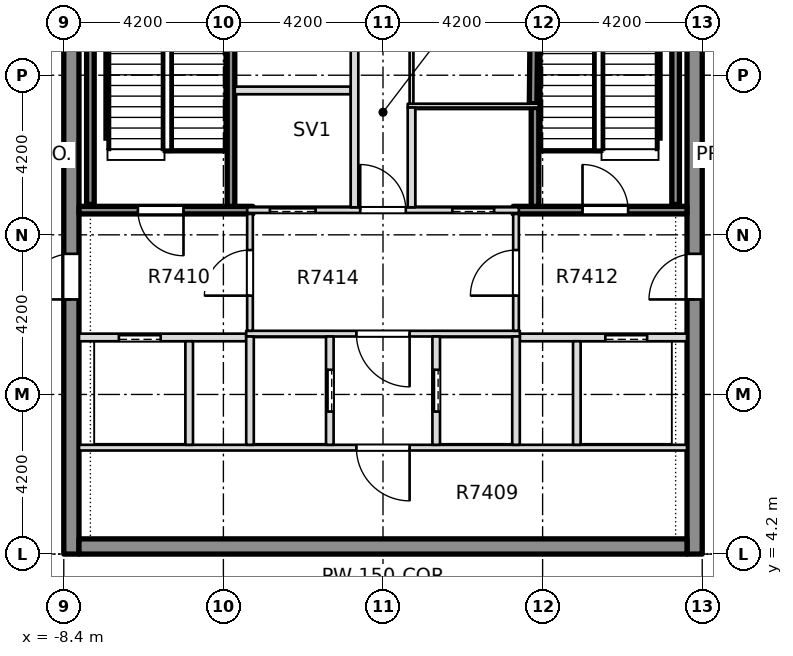
"""IFC4 building model, lengths in metres.
Left out: names, types, materials, properties, quantities, classifications, styles, units other than length and angle.
Written with IfcOpenShell. Run it as: python <this file> out.ifc"""

import sys

from ifc_helpers import new_model, si_unit, direction, frame, frame_2d, origin, place, context, subcontext, project, spatial, rectangle, extrude, element, fill, save


model = new_model("IFC4")
c1 = context("Model", 3, precision=1e-05, world=origin(), true_north=direction((0.0, 1.0)))
c2 = subcontext(c1, "Body", "Model", "MODEL_VIEW")
j1 = project(units=[si_unit("LENGTHUNIT", "METRE"), si_unit("PLANEANGLEUNIT", "RADIAN")], contexts=[c1])
p1 = place(None, origin())
s1 = spatial("IfcSite", under=j1, at=p1, CompositionType="ELEMENT")
p2 = place(p1, origin())
s2 = spatial("IfcBuilding", under=s1, at=p2, CompositionType="ELEMENT")
p3 = place(p2, frame((0.0, 0.0, 284.85)))
s3 = spatial("IfcBuildingStorey", under=s2, at=p3, CompositionType="ELEMENT", Elevation=284.85)
p4 = place(p3, frame((8.2, 4.2, -0.5), z_axis=(0.0, 0.0, 1.0), x_axis=(0.0, 1.0, 0.0)))
e1 = element("IfcWall", 1, at=p4, inside=s3, PredefinedType="SHEAR", context=c2, shape_type="SweptSolid", body=[
    extrude(rectangle(XDim=17.55, YDim=0.4, at=frame_2d((8.775, 0.0))), origin(), (0.0, 0.0, 1.0), 4.5),
])
p5 = place(p4, frame((6.7, 0.0, 0.5)))
e2 = element("IfcOpeningElement", 2, at=p5, cuts=e1, PredefinedType="OPENING", context=c2, shape_type="SweptSolid", body=[
    extrude(rectangle(XDim=1.2, YDim=2.1, at=frame_2d((0.6, 1.05))), frame((0.0, 0.21, 0.0), z_axis=(0.0, -1.0, 0.0), x_axis=(1.0, 0.0, 0.0)), (0.0, 0.0, 1.0), 0.42),
])
p6 = place(p3, frame((-8.2, 4.2, -0.5), z_axis=(0.0, 0.0, 1.0), x_axis=(0.0, 1.0, 0.0)))
e3 = element("IfcWall", 3, at=p6, inside=s3, PredefinedType="SHEAR", context=c2, shape_type="SweptSolid", body=[
    extrude(rectangle(XDim=17.55, YDim=0.4, at=frame_2d((8.775, 0.0))), origin(), (0.0, 0.0, 1.0), 4.5),
])
p7 = place(p6, frame((6.7, 0.0, 0.5)))
e4 = element("IfcOpeningElement", 4, at=p7, cuts=e3, PredefinedType="OPENING", context=c2, shape_type="SweptSolid", body=[
    extrude(rectangle(XDim=1.2, YDim=2.1, at=frame_2d((0.6, 1.05))), frame((0.0, 0.21, 0.0), z_axis=(0.0, -1.0, 0.0), x_axis=(1.0, 0.0, 0.0)), (0.0, 0.0, 1.0), 0.42),
])
p8 = place(p3, frame((-8.0, 4.4, -0.5), z_axis=(0.0, 0.0, 1.0), x_axis=(1.0, 0.0, 0.0)))
e5 = element("IfcWall", 5, at=p8, inside=s3, PredefinedType="SHEAR", context=c2, shape_type="SweptSolid", body=[
    extrude(rectangle(XDim=16.0, YDim=0.4, at=frame_2d((8.0, 0.0))), origin(), (0.0, 0.0, 1.0), 4.5),
])
p9 = place(p3, frame((-7.999, 7.0, 0.0), z_axis=(0.0, 0.0, 1.0), x_axis=(1.0, 0.0, 0.0)))
e6 = element("IfcWall", 6, at=p9, inside=s3, PredefinedType="PARTITIONING", context=c2, shape_type="SweptSolid", body=[
    extrude(rectangle(XDim=15.998, YDim=0.15, at=frame_2d((7.999, 0.0))), origin(), (0.0, 0.0, 1.0), 4.0),
])
p10 = place(p9, frame((7.299, 0.0, 0.0)))
e7 = element("IfcOpeningElement", 7, at=p10, cuts=e6, PredefinedType="OPENING", context=c2, shape_type="SweptSolid", body=[
    extrude(rectangle(XDim=1.4, YDim=2.1, at=frame_2d((0.7, 1.05))), frame((0.0, 0.085, 0.0), z_axis=(0.0, -1.0, 0.0), x_axis=(1.0, 0.0, 0.0)), (0.0, 0.0, 1.0), 0.17),
])
p11 = place(p3, frame((-7.999, 9.9, 0.0), z_axis=(0.0, 0.0, 1.0), x_axis=(1.0, 0.0, 0.0)))
e8 = element("IfcWall", 8, at=p11, inside=s3, PredefinedType="PARTITIONING", context=c2, shape_type="SweptSolid", body=[
    extrude(rectangle(XDim=4.399, YDim=0.2, at=frame_2d((2.199, 0.0))), origin(), (0.0, 0.0, 1.0), 4.0),
])
p12 = place(p11, frame((1.049, 0.0, 0.0)))
e9 = element("IfcOpeningElement", 9, at=p12, cuts=e8, PredefinedType="OPENING", context=c2, shape_type="SweptSolid", body=[
    extrude(rectangle(XDim=1.1, YDim=2.1, at=frame_2d((0.55, 1.05))), frame((0.0, 0.11, 0.0), z_axis=(0.0, -1.0, 0.0), x_axis=(1.0, 0.0, 0.0)), (0.0, 0.0, 1.0), 0.22),
])
p13 = place(p3, frame((3.6, 9.9, 0.0), z_axis=(0.0, 0.0, 1.0), x_axis=(1.0, 0.0, 0.0)))
e10 = element("IfcWall", 10, at=p13, inside=s3, PredefinedType="PARTITIONING", context=c2, shape_type="SweptSolid", body=[
    extrude(rectangle(XDim=4.399, YDim=0.2, at=frame_2d((2.199, 0.0))), origin(), (0.0, 0.0, 1.0), 4.0),
])
p14 = place(p13, frame((2.25, 0.0, 0.0)))
e11 = element("IfcOpeningElement", 11, at=p14, cuts=e10, PredefinedType="OPENING", context=c2, shape_type="SweptSolid", body=[
    extrude(rectangle(XDim=1.1, YDim=2.1, at=frame_2d((0.55, 1.05))), frame((0.0, 0.11, 0.0), z_axis=(0.0, -1.0, 0.0), x_axis=(1.0, 0.0, 0.0)), (0.0, 0.0, 1.0), 0.22),
])
p15 = place(p3, frame((-3.6, 10.0, 0.0), z_axis=(0.0, 0.0, 1.0), x_axis=(1.0, 0.0, 0.0)))
e12 = element("IfcWall", 12, at=p15, inside=s3, PredefinedType="PARTITIONING", context=c2, shape_type="SweptSolid", body=[
    extrude(rectangle(XDim=7.2, YDim=0.15, at=frame_2d((3.6, 0.0))), origin(), (0.0, 0.0, 1.0), 4.0),
])
p16 = place(p15, frame((2.9, 0.0, 0.0)))
e13 = element("IfcOpeningElement", 13, at=p16, cuts=e12, PredefinedType="OPENING", context=c2, shape_type="SweptSolid", body=[
    extrude(rectangle(XDim=1.4, YDim=2.1, at=frame_2d((0.7, 1.05))), frame((0.0, 0.085, 0.0), z_axis=(0.0, -1.0, 0.0), x_axis=(1.0, 0.0, 0.0)), (0.0, 0.0, 1.0), 0.17),
])
p17 = place(p3, frame((-7.999, 13.25, 0.0), z_axis=(0.0, 0.0, 1.0), x_axis=(1.0, 0.0, 0.0)))
e14 = element("IfcWall", 14, at=p17, inside=s3, PredefinedType="SOLIDWALL", context=c2, shape_type="SweptSolid", body=[
    extrude(rectangle(XDim=4.574, YDim=0.2, at=frame_2d((2.287, 0.0))), origin(), (0.0, 0.0, 1.0), 4.0),
])
p18 = place(p17, frame((1.549, 0.0, 0.0)))
e15 = element("IfcOpeningElement", 15, at=p18, cuts=e14, PredefinedType="OPENING", context=c2, shape_type="SweptSolid", body=[
    extrude(rectangle(XDim=1.2, YDim=2.1, at=frame_2d((0.6, 1.05))), frame((0.0, 0.11, 0.0), z_axis=(0.0, -1.0, 0.0), x_axis=(1.0, 0.0, 0.0)), (0.0, 0.0, 1.0), 0.22),
])
p19 = place(p3, frame((-3.575, 13.25, 0.0), z_axis=(0.0, 0.0, 1.0), x_axis=(1.0, 0.0, 0.0)))
e16 = element("IfcWall", 16, at=p19, inside=s3, PredefinedType="PARTITIONING", context=c2, shape_type="SweptSolid", body=[
    extrude(rectangle(XDim=7.15, YDim=0.15, at=frame_2d((3.575, 0.0))), origin(), (0.0, 0.0, 1.0), 4.0),
])
p20 = place(p19, frame((0.6, 0.0, 0.0)))
e17 = element("IfcOpeningElement", 17, at=p20, cuts=e16, PredefinedType="OPENING", context=c2, shape_type="SweptSolid", body=[
    extrude(rectangle(XDim=1.2, YDim=2.1, at=frame_2d((0.6, 1.05))), frame((0.0, 0.085, 0.0), z_axis=(0.0, -1.0, 0.0), x_axis=(1.0, 0.0, 0.0)), (0.0, 0.0, 1.0), 0.17),
])
p21 = place(p19, frame((5.4, 0.0, 0.0)))
e18 = element("IfcOpeningElement", 18, at=p21, cuts=e16, PredefinedType="OPENING", context=c2, shape_type="SweptSolid", body=[
    extrude(rectangle(XDim=1.1, YDim=2.1, at=frame_2d((0.55, 1.05))), frame((0.0, 0.085, 0.0), z_axis=(0.0, -1.0, 0.0), x_axis=(1.0, 0.0, 0.0)), (0.0, 0.0, 1.0), 0.17),
])
p22 = place(p19, frame((2.975, 0.0, 0.0)))
e19 = element("IfcOpeningElement", 19, at=p22, cuts=e16, PredefinedType="OPENING", context=c2, shape_type="SweptSolid", body=[
    extrude(rectangle(XDim=1.2, YDim=2.1, at=frame_2d((0.6, 1.05))), frame((0.0, 0.085, 0.0), z_axis=(0.0, -1.0, 0.0), x_axis=(1.0, 0.0, 0.0)), (0.0, 0.0, 1.0), 0.17),
])
p23 = place(p3, frame((3.425, 13.25, 0.0), z_axis=(0.0, 0.0, 1.0), x_axis=(1.0, 0.0, 0.0)))
e20 = element("IfcWall", 20, at=p23, inside=s3, PredefinedType="SOLIDWALL", context=c2, shape_type="SweptSolid", body=[
    extrude(rectangle(XDim=4.574, YDim=0.2, at=frame_2d((2.287, 0.0))), origin(), (0.0, 0.0, 1.0), 4.0),
])
p24 = place(p23, frame((1.825, 0.0, 0.0)))
e21 = element("IfcOpeningElement", 21, at=p24, cuts=e20, PredefinedType="OPENING", context=c2, shape_type="SweptSolid", body=[
    extrude(rectangle(XDim=1.2, YDim=2.1, at=frame_2d((0.6, 1.05))), frame((0.0, 0.11, 0.0), z_axis=(0.0, -1.0, 0.0), x_axis=(1.0, 0.0, 0.0)), (0.0, 0.0, 1.0), 0.22),
])
p25 = place(p3, frame((0.65, 16.0, 0.0), z_axis=(0.0, 0.0, 1.0), x_axis=(1.0, 0.0, 0.0)))
e22 = element("IfcWall", 22, at=p25, inside=s3, PredefinedType="PARTITIONING", context=c2, shape_type="SweptSolid", body=[
    extrude(rectangle(XDim=3.45, YDim=0.1, at=frame_2d((1.725, 0.0))), origin(), (0.0, 0.0, 1.0), 4.0),
])
p26 = place(p3, frame((-3.9, 16.4, 0.0), z_axis=(0.0, 0.0, 1.0), x_axis=(1.0, 0.0, 0.0)))
e23 = element("IfcWall", 23, at=p26, inside=s3, PredefinedType="PARTITIONING", context=c2, shape_type="SweptSolid", body=[
    extrude(rectangle(XDim=3.05, YDim=0.2, at=frame_2d((1.525, 0.0))), origin(), (0.0, 0.0, 1.0), 4.0),
])
p27 = place(p3, frame((-5.1, 7.075, 0.0), z_axis=(0.0, 0.0, 1.0), x_axis=(0.0, 1.0, 0.0)))
e24 = element("IfcWall", 24, at=p27, inside=s3, PredefinedType="PARTITIONING", context=c2, shape_type="SweptSolid", body=[
    extrude(rectangle(XDim=2.725, YDim=0.2, at=frame_2d((1.363, 0.0))), origin(), (0.0, 0.0, 1.0), 4.0),
])
p28 = place(p3, frame((-4.0, 13.35, 0.0), z_axis=(0.0, 0.0, 1.0), x_axis=(0.0, 1.0, 0.0)))
e25 = element("IfcWall", 25, at=p28, inside=s3, PredefinedType="SOLIDWALL", context=c2, shape_type="SweptSolid", body=[
    extrude(rectangle(XDim=7.999, YDim=0.2, at=frame_2d((4.0, 0.0))), origin(), (0.0, 0.0, 1.0), 4.0),
])
p29 = place(p3, frame((-3.5, 7.075, 0.0), z_axis=(0.0, 0.0, 1.0), x_axis=(0.0, 1.0, 0.0)))
e26 = element("IfcWall", 26, at=p29, inside=s3, PredefinedType="PARTITIONING", context=c2, shape_type="SweptSolid", body=[
    extrude(rectangle(XDim=2.85, YDim=0.2, at=frame_2d((1.425, 0.0))), origin(), (0.0, 0.0, 1.0), 4.0),
])
p30 = place(p3, frame((-3.5, 10.075, 0.0), z_axis=(0.0, 0.0, 1.0), x_axis=(0.0, 1.0, 0.0)))
e27 = element("IfcWall", 27, at=p30, inside=s3, PredefinedType="PARTITIONING", context=c2, shape_type="SweptSolid", body=[
    extrude(rectangle(XDim=3.075, YDim=0.15, at=frame_2d((1.538, 0.0))), origin(), (0.0, 0.0, 1.0), 4.0),
])
p31 = place(p30, frame((0.925, 0.0, 0.0)))
e28 = element("IfcOpeningElement", 28, at=p31, cuts=e27, PredefinedType="OPENING", context=c2, shape_type="SweptSolid", body=[
    extrude(rectangle(XDim=1.2, YDim=2.1, at=frame_2d((0.6, 1.05))), frame((0.0, 0.085, 0.0), z_axis=(0.0, -1.0, 0.0), x_axis=(1.0, 0.0, 0.0)), (0.0, 0.0, 1.0), 0.17),
])
p32 = place(p3, frame((-1.4, 7.075, 0.0), z_axis=(0.0, 0.0, 1.0), x_axis=(0.0, 1.0, 0.0)))
e29 = element("IfcWall", 29, at=p32, inside=s3, PredefinedType="PARTITIONING", context=c2, shape_type="SweptSolid", body=[
    extrude(rectangle(XDim=2.85, YDim=0.2, at=frame_2d((1.425, 0.0))), origin(), (0.0, 0.0, 1.0), 4.0),
])
p33 = place(p32, frame((0.875, 0.0, 0.0)))
e30 = element("IfcOpeningElement", 30, at=p33, cuts=e29, PredefinedType="OPENING", context=c2, shape_type="SweptSolid", body=[
    extrude(rectangle(XDim=1.1, YDim=2.1, at=frame_2d((0.55, 1.05))), frame((0.0, 0.11, 0.0), z_axis=(0.0, -1.0, 0.0), x_axis=(1.0, 0.0, 0.0)), (0.0, 0.0, 1.0), 0.22),
])
p34 = place(p3, frame((-0.75, 13.325, 0.0), z_axis=(0.0, 0.0, 1.0), x_axis=(0.0, 1.0, 0.0)))
e31 = element("IfcWall", 31, at=p34, inside=s3, PredefinedType="PARTITIONING", context=c2, shape_type="SweptSolid", body=[
    extrude(rectangle(XDim=8.024, YDim=0.2, at=frame_2d((4.012, 0.0))), origin(), (0.0, 0.0, 1.0), 4.0),
])
p35 = place(p34, frame((4.8, 0.0, 0.0)))
e32 = element("IfcOpeningElement", 32, at=p35, cuts=e31, PredefinedType="OPENING", context=c2, shape_type="SweptSolid", body=[
    extrude(rectangle(XDim=0.95, YDim=2.1, at=frame_2d((0.475, 1.05))), frame((0.0, 0.11, 0.0), z_axis=(0.0, -1.0, 0.0), x_axis=(1.0, 0.0, 0.0)), (0.0, 0.0, 1.0), 0.22),
])
p36 = place(p3, frame((0.75, 13.325, 0.0), z_axis=(0.0, 0.0, 1.0), x_axis=(0.0, 1.0, 0.0)))
e33 = element("IfcWall", 33, at=p36, inside=s3, PredefinedType="PARTITIONING", context=c2, shape_type="SweptSolid", body=[
    extrude(rectangle(XDim=2.625, YDim=0.2, at=frame_2d((1.312, 0.0))), origin(), (0.0, 0.0, 1.0), 4.0),
])
p37 = place(p3, frame((0.75, 16.05, 0.0), z_axis=(0.0, 0.0, 1.0), x_axis=(0.0, 1.0, 0.0)))
e34 = element("IfcWall", 34, at=p37, inside=s3, PredefinedType="PARTITIONING", context=c2, shape_type="SweptSolid", body=[
    extrude(rectangle(XDim=5.299, YDim=0.1, at=frame_2d((2.649, 0.0))), origin(), (0.0, 0.0, 1.0), 4.0),
])
p38 = place(p37, frame((1.875, 0.0, 0.0)))
e35 = element("IfcOpeningElement", 35, at=p38, cuts=e34, PredefinedType="OPENING", context=c2, shape_type="SweptSolid", body=[
    extrude(rectangle(XDim=0.95, YDim=2.1, at=frame_2d((0.475, 1.05))), frame((0.0, 0.06, 0.0), z_axis=(0.0, -1.0, 0.0), x_axis=(1.0, 0.0, 0.0)), (0.0, 0.0, 1.0), 0.12),
])
p39 = place(p3, frame((1.4, 7.075, 0.0), z_axis=(0.0, 0.0, 1.0), x_axis=(0.0, 1.0, 0.0)))
e36 = element("IfcWall", 36, at=p39, inside=s3, PredefinedType="PARTITIONING", context=c2, shape_type="SweptSolid", body=[
    extrude(rectangle(XDim=2.85, YDim=0.2, at=frame_2d((1.425, 0.0))), origin(), (0.0, 0.0, 1.0), 4.0),
])
p40 = place(p39, frame((0.875, 0.0, 0.0)))
e37 = element("IfcOpeningElement", 37, at=p40, cuts=e36, PredefinedType="OPENING", context=c2, shape_type="SweptSolid", body=[
    extrude(rectangle(XDim=1.1, YDim=2.1, at=frame_2d((0.55, 1.05))), frame((0.0, 0.11, 0.0), z_axis=(0.0, -1.0, 0.0), x_axis=(1.0, 0.0, 0.0)), (0.0, 0.0, 1.0), 0.22),
])
p41 = place(p3, frame((3.5, 7.075, 0.0), z_axis=(0.0, 0.0, 1.0), x_axis=(0.0, 1.0, 0.0)))
e38 = element("IfcWall", 38, at=p41, inside=s3, PredefinedType="PARTITIONING", context=c2, shape_type="SweptSolid", body=[
    extrude(rectangle(XDim=2.85, YDim=0.2, at=frame_2d((1.425, 0.0))), origin(), (0.0, 0.0, 1.0), 4.0),
])
p42 = place(p3, frame((3.5, 10.075, 0.0), z_axis=(0.0, 0.0, 1.0), x_axis=(0.0, 1.0, 0.0)))
e39 = element("IfcWall", 39, at=p42, inside=s3, PredefinedType="PARTITIONING", context=c2, shape_type="SweptSolid", body=[
    extrude(rectangle(XDim=3.075, YDim=0.15, at=frame_2d((1.538, 0.0))), origin(), (0.0, 0.0, 1.0), 4.0),
])
p43 = place(p42, frame((0.925, 0.0, 0.0)))
e40 = element("IfcOpeningElement", 40, at=p43, cuts=e39, PredefinedType="OPENING", context=c2, shape_type="SweptSolid", body=[
    extrude(rectangle(XDim=1.2, YDim=2.1, at=frame_2d((0.6, 1.05))), frame((0.0, 0.085, 0.0), z_axis=(0.0, -1.0, 0.0), x_axis=(1.0, 0.0, 0.0)), (0.0, 0.0, 1.0), 0.17),
])
p44 = place(p3, frame((4.0, 13.35, 0.0), z_axis=(0.0, 0.0, 1.0), x_axis=(0.0, 1.0, 0.0)))
e41 = element("IfcWall", 41, at=p44, inside=s3, PredefinedType="SOLIDWALL", context=c2, shape_type="SweptSolid", body=[
    extrude(rectangle(XDim=2.6, YDim=0.2, at=frame_2d((1.3, 0.0))), origin(), (0.0, 0.0, 1.0), 4.0),
])
p45 = place(p3, frame((3.95, 16.05, 0.0), z_axis=(0.0, 0.0, 1.0), x_axis=(0.009534450323, 0.999954546095, 0.0)))
e42 = element("IfcWall", 42, at=p45, inside=s3, PredefinedType="SOLIDWALL", context=c2, shape_type="SweptSolid", body=[
    extrude(rectangle(XDim=5.249, YDim=0.2, at=frame_2d((2.625, 0.0))), origin(), (0.0, 0.0, 1.0), 4.0),
])
p46 = place(p3, frame((5.1, 7.075, 0.0), z_axis=(0.0, 0.0, 1.0), x_axis=(0.0, 1.0, 0.0)))
e43 = element("IfcWall", 43, at=p46, inside=s3, PredefinedType="PARTITIONING", context=c2, shape_type="SweptSolid", body=[
    extrude(rectangle(XDim=2.725, YDim=0.2, at=frame_2d((1.363, 0.0))), origin(), (0.0, 0.0, 1.0), 4.0),
])
for number, where, z_axis, x_axis in (
    (44, (-7.7, 13.4, 0.0), (0.0, 0.0, 1.0), (0.0, 1.0, 0.0)),
    (45, (7.7, 13.4, 0.0), (0.0, 0.0, 1.0), (0.0, 1.0, 0.0)),
):
    element("IfcWall", number, at=place(p3, frame(where, z_axis=z_axis, x_axis=x_axis)), inside=s3, PredefinedType="SOLIDWALL", context=c2, shape_type="SweptSolid", body=[
        extrude(rectangle(XDim=7.45, YDim=0.2, at=frame_2d((3.725, 0.0))), origin(), (0.0, 0.0, 1.0), 4.0),
    ])
p47 = place(p18, origin())
e46 = element("IfcDoor", 46, at=p47, inside=s3, OperationType="SINGLE_SWING_LEFT", PredefinedType="DOOR", context=c2, shape_type="SweptSolid", body=[
    extrude(rectangle(XDim=1.2, YDim=2.1, at=frame_2d((0.6, 1.05))), frame((0.0, 0.025, 0.0), z_axis=(0.0, -1.0, 0.0), x_axis=(1.0, 0.0, 0.0)), (0.0, 0.0, 1.0), 0.05),
])
fill(e15, e46)
p48 = place(p12, origin())
e47 = element("IfcDoor", 47, at=p48, inside=s3, OperationType="SLIDING_TO_LEFT", PredefinedType="DOOR", context=c2, shape_type="SweptSolid", body=[
    extrude(rectangle(XDim=1.1, YDim=2.1, at=frame_2d((0.55, 1.05))), frame((0.0, 0.025, 0.0), z_axis=(0.0, -1.0, 0.0), x_axis=(1.0, 0.0, 0.0)), (0.0, 0.0, 1.0), 0.05),
])
fill(e9, e47)
p49 = place(p24, origin())
e48 = element("IfcDoor", 48, at=p49, inside=s3, OperationType="SINGLE_SWING_RIGHT", PredefinedType="DOOR", context=c2, shape_type="SweptSolid", body=[
    extrude(rectangle(XDim=1.2, YDim=2.1, at=frame_2d((0.6, 1.05))), frame((0.0, 0.025, 0.0), z_axis=(0.0, -1.0, 0.0), x_axis=(1.0, 0.0, 0.0)), (0.0, 0.0, 1.0), 0.05),
])
fill(e21, e48)
p50 = place(p14, origin())
e49 = element("IfcDoor", 49, at=p50, inside=s3, OperationType="SLIDING_TO_LEFT", PredefinedType="DOOR", context=c2, shape_type="SweptSolid", body=[
    extrude(rectangle(XDim=1.1, YDim=2.1, at=frame_2d((0.55, 1.05))), frame((0.0, 0.025, 0.0), z_axis=(0.0, -1.0, 0.0), x_axis=(1.0, 0.0, 0.0)), (0.0, 0.0, 1.0), 0.05),
])
fill(e11, e49)
p51 = place(p10, origin())
e50 = element("IfcDoor", 50, at=p51, inside=s3, OperationType="SINGLE_SWING_RIGHT", PredefinedType="DOOR", context=c2, shape_type="SweptSolid", body=[
    extrude(rectangle(XDim=1.4, YDim=2.1, at=frame_2d((0.7, 1.05))), frame((0.0, 0.025, 0.0), z_axis=(0.0, -1.0, 0.0), x_axis=(1.0, 0.0, 0.0)), (0.0, 0.0, 1.0), 0.05),
])
fill(e7, e50)
p52 = place(p16, origin())
e51 = element("IfcDoor", 51, at=p52, inside=s3, OperationType="SINGLE_SWING_RIGHT", PredefinedType="DOOR", context=c2, shape_type="SweptSolid", body=[
    extrude(rectangle(XDim=1.4, YDim=2.1, at=frame_2d((0.7, 1.05))), frame((0.0, 0.025, 0.0), z_axis=(0.0, -1.0, 0.0), x_axis=(1.0, 0.0, 0.0)), (0.0, 0.0, 1.0), 0.05),
])
fill(e13, e51)
p53 = place(p33, origin())
e52 = element("IfcDoor", 52, at=p53, inside=s3, OperationType="SLIDING_TO_RIGHT", PredefinedType="DOOR", context=c2, shape_type="SweptSolid", body=[
    extrude(rectangle(XDim=1.1, YDim=2.1, at=frame_2d((0.55, 1.05))), frame((0.0, 0.025, 0.0), z_axis=(0.0, -1.0, 0.0), x_axis=(1.0, 0.0, 0.0)), (0.0, 0.0, 1.0), 0.05),
])
fill(e30, e52)
p54 = place(p40, origin())
e53 = element("IfcDoor", 53, at=p54, inside=s3, OperationType="SLIDING_TO_RIGHT", PredefinedType="DOOR", context=c2, shape_type="SweptSolid", body=[
    extrude(rectangle(XDim=1.1, YDim=2.1, at=frame_2d((0.55, 1.05))), frame((0.0, 0.025, 0.0), z_axis=(0.0, -1.0, 0.0), x_axis=(1.0, 0.0, 0.0)), (0.0, 0.0, 1.0), 0.05),
])
fill(e37, e53)
p55 = place(p20, origin())
e54 = element("IfcDoor", 54, at=p55, inside=s3, OperationType="SLIDING_TO_RIGHT", PredefinedType="DOOR", context=c2, shape_type="SweptSolid", body=[
    extrude(rectangle(XDim=1.2, YDim=2.1, at=frame_2d((0.6, 1.05))), frame((0.0, 0.025, 0.0), z_axis=(0.0, -1.0, 0.0), x_axis=(1.0, 0.0, 0.0)), (0.0, 0.0, 1.0), 0.05),
])
fill(e17, e54)
p56 = place(p21, origin())
e55 = element("IfcDoor", 55, at=p56, inside=s3, OperationType="SLIDING_TO_LEFT", PredefinedType="DOOR", context=c2, shape_type="SweptSolid", body=[
    extrude(rectangle(XDim=1.1, YDim=2.1, at=frame_2d((0.55, 1.05))), frame((0.0, 0.025, 0.0), z_axis=(0.0, -1.0, 0.0), x_axis=(1.0, 0.0, 0.0)), (0.0, 0.0, 1.0), 0.05),
])
fill(e18, e55)
p57 = place(p22, origin())
e56 = element("IfcDoor", 56, at=p57, inside=s3, OperationType="SINGLE_SWING_RIGHT", PredefinedType="DOOR", context=c2, shape_type="SweptSolid", body=[
    extrude(rectangle(XDim=1.2, YDim=2.1, at=frame_2d((0.6, 1.05))), frame((0.0, 0.025, 0.0), z_axis=(0.0, -1.0, 0.0), x_axis=(1.0, 0.0, 0.0)), (0.0, 0.0, 1.0), 0.05),
])
fill(e19, e56)
p58 = place(p31, origin())
e57 = element("IfcDoor", 57, at=p58, inside=s3, OperationType="SINGLE_SWING_RIGHT", PredefinedType="DOOR", context=c2, shape_type="SweptSolid", body=[
    extrude(rectangle(XDim=1.2, YDim=2.1, at=frame_2d((0.6, 1.05))), frame((0.0, 0.025, 0.0), z_axis=(0.0, -1.0, 0.0), x_axis=(1.0, 0.0, 0.0)), (0.0, 0.0, 1.0), 0.05),
])
fill(e28, e57)
p59 = place(p43, origin())
e58 = element("IfcDoor", 58, at=p59, inside=s3, OperationType="SINGLE_SWING_LEFT", PredefinedType="DOOR", context=c2, shape_type="SweptSolid", body=[
    extrude(rectangle(XDim=1.2, YDim=2.1, at=frame_2d((0.6, 1.05))), frame((0.0, 0.025, 0.0), z_axis=(0.0, -1.0, 0.0), x_axis=(1.0, 0.0, 0.0)), (0.0, 0.0, 1.0), 0.05),
])
fill(e40, e58)
p60 = place(p7, origin())
e59 = element("IfcDoor", 59, at=p60, inside=s3, OperationType="SINGLE_SWING_LEFT", PredefinedType="DOOR", context=c2, shape_type="SweptSolid", body=[
    extrude(rectangle(XDim=1.2, YDim=2.1, at=frame_2d((0.6, 1.05))), frame((0.0, 0.025, 0.0), z_axis=(0.0, -1.0, 0.0), x_axis=(1.0, 0.0, 0.0)), (0.0, 0.0, 1.0), 0.05),
])
fill(e4, e59)
p61 = place(p5, origin())
e60 = element("IfcDoor", 60, at=p61, inside=s3, OperationType="SINGLE_SWING_LEFT", PredefinedType="DOOR", context=c2, shape_type="SweptSolid", body=[
    extrude(rectangle(XDim=1.2, YDim=2.1, at=frame_2d((0.6, 1.05))), frame((0.0, 0.025, 0.0), z_axis=(0.0, -1.0, 0.0), x_axis=(1.0, 0.0, 0.0)), (0.0, 0.0, 1.0), 0.05),
])
fill(e2, e60)
save(model, sys.argv[1])
